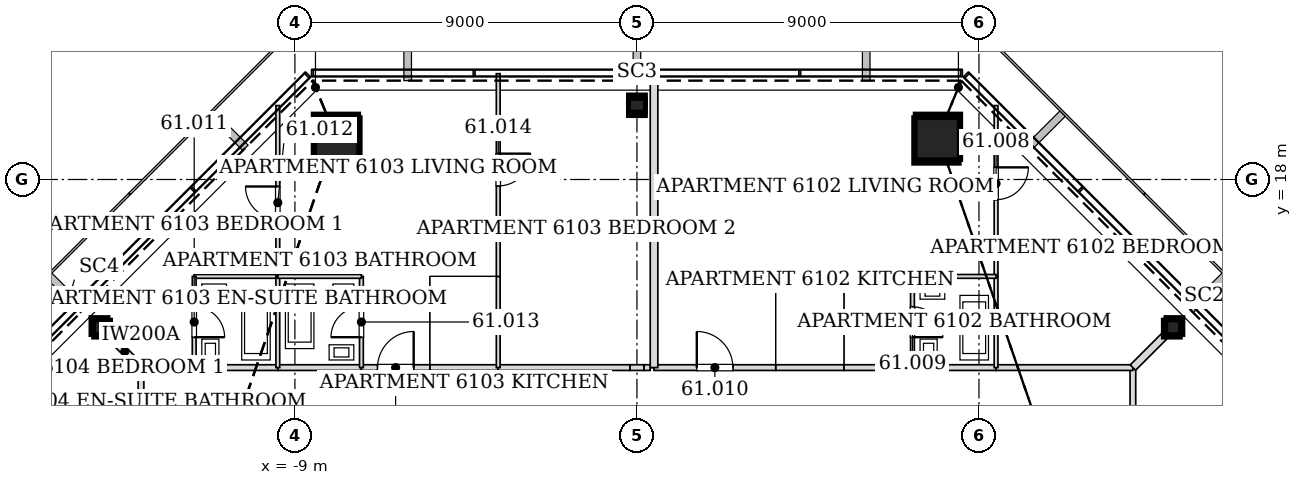
"""IFC4 building model, lengths in metres.
Left out: names, types, materials, properties, quantities, classifications, styles, units other than length and angle.
Written with IfcOpenShell. Run it as: python <this file> out.ifc"""

import sys

from ifc_helpers import new_model, si_unit, direction, frame, frame_2d, origin, origin_2d, place, context, subcontext, project, spatial, rectangle, hollow_rectangle, extrude, element, fill, save


model = new_model("IFC4")
c1 = context("Model", 3, precision=1e-05, world=origin(), true_north=direction((0.0, 1.0)))
c2 = subcontext(c1, "Body", "Model", "MODEL_VIEW")
j1 = project(units=[si_unit("LENGTHUNIT", "METRE"), si_unit("PLANEANGLEUNIT", "RADIAN")], contexts=[c1])
p1 = place(None, origin())
s1 = spatial("IfcSite", under=j1, at=p1, CompositionType="ELEMENT")
p2 = place(p1, origin())
s2 = spatial("IfcBuilding", under=s1, at=p2, CompositionType="ELEMENT")
p3 = place(p2, frame((0.0, 0.0, 255.0)))
s3 = spatial("IfcBuildingStorey", under=s2, at=p3, CompositionType="ELEMENT", Elevation=255.0)
for number, where, z_axis, x_axis in (
    (1, (7.921, 19.123, 0.0), (-0.012, -0.028, 1.0), (0.924, -0.383, 0.0)),
    (2, (-7.921, 19.123, 0.0), (0.012, -0.028, 1.0), (0.924, 0.383, 0.0)),
):
    element("IfcColumn", number, at=place(p3, frame(where, z_axis=z_axis, x_axis=x_axis)), inside=s3, PredefinedType="COLUMN", context=c2, shape_type="SweptSolid", body=[
        extrude(hollow_rectangle(XDim=1.2, YDim=1.2, WallThickness=0.055, at=origin_2d()), origin(), (0.0, 0.0, 1.0), 3.401),
    ])
for number, where, z_axis, x_axis in (
    (3, (14.143, 14.143, 0.0), (-0.02, -0.02, 1.0), (0.707, -0.707, 0.0)),
    (4, (0.0, 20.001, 0.0), (0.0, -0.028, 1.0), (1.0, 0.0, 0.0)),
    (5, (-14.143, 14.143, 0.0), (0.02, -0.02, 1.0), (0.707, 0.707, 0.0)),
):
    element("IfcColumn", number, at=place(p3, frame(where, z_axis=z_axis, x_axis=x_axis)), inside=s3, PredefinedType="COLUMN", context=c2, shape_type="SweptSolid", body=[
        extrude(hollow_rectangle(XDim=0.45, YDim=0.45, WallThickness=0.02, at=origin_2d()), origin(), (0.0, 0.0, 1.0), 3.401),
    ])
p4 = place(p3, frame((13.05, 8.849, 0.0), z_axis=(0.0, 0.0, 1.0), x_axis=(0.0, 1.0, 0.0)))
e6 = element("IfcWall", 6, at=p4, inside=s3, PredefinedType="PARTITIONING", context=c2, shape_type="SweptSolid", body=[
    extrude(rectangle(XDim=4.201, YDim=0.15, at=frame_2d((2.101, 0.0))), origin(), (0.0, 0.0, 1.0), 2.349),
])
p5 = place(p3, frame((13.05, 13.05, 0.0), z_axis=(0.0, 0.0, 1.0), x_axis=(-1.0, 0.0, 0.0)))
e7 = element("IfcWall", 7, at=p5, inside=s3, PredefinedType="PARTITIONING", context=c2, shape_type="SweptSolid", body=[
    extrude(rectangle(XDim=3.601, YDim=0.15, at=frame_2d((1.801, 0.0))), origin(), (0.0, 0.0, 1.0), 2.349),
])
p6 = place(p3, frame((9.451, 13.05, 0.0), z_axis=(0.0, 0.0, 1.0), x_axis=(-1.0, 0.0, 0.0)))
e8 = element("IfcWall", 8, at=p6, inside=s3, PredefinedType="PARTITIONING", context=c2, shape_type="SweptSolid", body=[
    extrude(rectangle(XDim=2.202, YDim=0.15, at=frame_2d((1.101, 0.0))), origin(), (0.0, 0.0, 1.0), 2.662),
])
p7 = place(p3, frame((5.451, 13.05, 0.0), z_axis=(0.0, 0.0, 1.0), x_axis=(-1.0, 0.0, 0.0)))
e9 = element("IfcWall", 9, at=p7, inside=s3, PredefinedType="PARTITIONING", context=c2, shape_type="SweptSolid", body=[
    extrude(rectangle(XDim=1.802, YDim=0.15, at=frame_2d((0.901, 0.0))), origin(), (0.0, 0.0, 1.0), 2.662),
])
p8 = place(p3, frame((3.651, 13.05, 0.0), z_axis=(0.0, 0.0, 1.0), x_axis=(-1.0, 0.0, 0.0)))
e10 = element("IfcWall", 10, at=p8, inside=s3, PredefinedType="PARTITIONING", context=c2, shape_type="SweptSolid", body=[
    extrude(rectangle(XDim=3.202, YDim=0.15, at=frame_2d((1.601, 0.0))), origin(), (0.0, 0.0, 1.0), 2.662),
])
p9 = place(p8, frame((1.126, 0.0, 0.0)))
e11 = element("IfcOpeningElement", 11, at=p9, cuts=e10, PredefinedType="OPENING", context=c2, shape_type="SweptSolid", body=[
    extrude(rectangle(XDim=0.95, YDim=2.1, at=frame_2d((0.475, 1.05))), frame((0.0, 0.085, 0.0), z_axis=(0.0, -1.0, 0.0), x_axis=(1.0, 0.0, 0.0)), (0.0, 0.0, 1.0), 0.17),
])
p10 = place(p3, frame((7.251, 13.05, 0.0), z_axis=(0.0, 0.0, 1.0), x_axis=(-1.0, 0.0, 0.0)))
e12 = element("IfcWall", 12, at=p10, inside=s3, PredefinedType="PARTITIONING", context=c2, shape_type="SweptSolid", body=[
    extrude(rectangle(XDim=1.802, YDim=0.15, at=frame_2d((0.901, 0.0))), origin(), (0.0, 0.0, 1.0), 2.662),
])
p11 = place(p3, frame((-9.449, 13.05, 0.0), z_axis=(0.0, 0.0, 1.0), x_axis=(-1.0, 0.0, 0.0)))
e13 = element("IfcWall", 13, at=p11, inside=s3, PredefinedType="PARTITIONING", context=c2, shape_type="SweptSolid", body=[
    extrude(rectangle(XDim=2.202, YDim=0.15, at=frame_2d((1.101, 0.0))), origin(), (0.0, 0.0, 1.0), 2.349),
])
p12 = place(p3, frame((-11.649, 13.05, 0.0), z_axis=(0.0, 0.0, 1.0), x_axis=(-1.0, 0.0, 0.0)))
e14 = element("IfcWall", 14, at=p12, inside=s3, PredefinedType="PARTITIONING", context=c2, shape_type="SweptSolid", body=[
    extrude(rectangle(XDim=1.401, YDim=0.15, at=frame_2d((0.701, 0.0))), origin(), (0.0, 0.0, 1.0), 2.656),
])
p13 = place(p3, frame((-7.249, 13.05, 0.0), z_axis=(0.0, 0.0, 1.0), x_axis=(-1.0, 0.0, 0.0)))
e15 = element("IfcWall", 15, at=p13, inside=s3, PredefinedType="PARTITIONING", context=c2, shape_type="SweptSolid", body=[
    extrude(rectangle(XDim=2.202, YDim=0.15, at=frame_2d((1.101, 0.0))), origin(), (0.0, 0.0, 1.0), 2.662),
])
p14 = place(p3, frame((-3.649, 13.05, 0.0), z_axis=(0.0, 0.0, 1.0), x_axis=(-1.0, 0.0, 0.0)))
e16 = element("IfcWall", 16, at=p14, inside=s3, PredefinedType="PARTITIONING", context=c2, shape_type="SweptSolid", body=[
    extrude(rectangle(XDim=1.802, YDim=0.15, at=frame_2d((0.901, 0.0))), origin(), (0.0, 0.0, 1.0), 2.662),
])
p15 = place(p3, frame((0.35, 13.05, 0.0), z_axis=(0.0, 0.0, 1.0), x_axis=(-1.0, 0.0, 0.0)))
e17 = element("IfcWall", 17, at=p15, inside=s3, PredefinedType="PARTITIONING", context=c2, shape_type="SweptSolid", body=[
    extrude(rectangle(XDim=0.168, YDim=0.15, at=frame_2d((0.084, 0.0))), origin(), (0.0, 0.0, 1.0), 2.662),
])
p16 = place(p3, frame((-0.182, 13.05, 0.0), z_axis=(0.0, 0.0, 1.0), x_axis=(-1.0, 0.0, 0.0)))
e18 = element("IfcWall", 18, at=p16, inside=s3, PredefinedType="PARTITIONING", context=c2, shape_type="SweptSolid", body=[
    extrude(rectangle(XDim=3.469, YDim=0.15, at=frame_2d((1.734, 0.0))), origin(), (0.0, 0.0, 1.0), 2.662),
])
p17 = place(p3, frame((0.182, 13.05, 0.0), z_axis=(0.0, 0.0, 1.0), x_axis=(-1.0, 0.0, 0.0)))
e19 = element("IfcWall", 19, at=p17, inside=s3, PredefinedType="PARTITIONING", context=c2, shape_type="SweptSolid", body=[
    extrude(rectangle(XDim=0.365, YDim=0.15, at=frame_2d((0.182, 0.0))), origin(), (0.0, 0.0, 1.0), 2.268),
])
p18 = place(p3, frame((-5.449, 13.05, 0.0), z_axis=(0.0, 0.0, 1.0), x_axis=(-1.0, 0.0, 0.0)))
e20 = element("IfcWall", 20, at=p18, inside=s3, PredefinedType="PARTITIONING", context=c2, shape_type="SweptSolid", body=[
    extrude(rectangle(XDim=1.802, YDim=0.15, at=frame_2d((0.901, 0.0))), origin(), (0.0, 0.0, 1.0), 2.662),
])
p19 = place(p18, frame((0.426, 0.0, 0.0)))
e21 = element("IfcOpeningElement", 21, at=p19, cuts=e20, PredefinedType="OPENING", context=c2, shape_type="SweptSolid", body=[
    extrude(rectangle(XDim=0.95, YDim=2.1, at=frame_2d((0.475, 1.05))), frame((0.0, 0.085, 0.0), z_axis=(0.0, -1.0, 0.0), x_axis=(1.0, 0.0, 0.0)), (0.0, 0.0, 1.0), 0.17),
])
p20 = place(p3, frame((-13.05, 13.05, 0.0), z_axis=(0.0, 0.0, 1.0), x_axis=(0.0, -1.0, 0.0)))
e22 = element("IfcWall", 22, at=p20, inside=s3, PredefinedType="PARTITIONING", context=c2, shape_type="SweptSolid", body=[
    extrude(rectangle(XDim=1.401, YDim=0.15, at=frame_2d((0.701, 0.0))), origin(), (0.0, 0.0, 1.0), 2.656),
])
p21 = place(p3, frame((13.902, 13.902, 0.0), z_axis=(0.0, 0.0, 1.0), x_axis=(-0.707106781187, -0.707106781187, 0.0)))
e23 = element("IfcWall", 23, at=p21, inside=s3, PredefinedType="PARTITIONING", context=c2, shape_type="SweptSolid", body=[
    extrude(rectangle(XDim=1.205, YDim=0.2, at=frame_2d((0.603, 0.0))), origin(), (0.0, 0.0, 1.0), 2.656),
])
p22 = place(p3, frame((9.45, 15.451, 0.0), z_axis=(0.0, 0.0, 1.0), x_axis=(0.0, -1.0, 0.0)))
e24 = element("IfcWall", 24, at=p22, inside=s3, PredefinedType="PARTITIONING", context=c2, shape_type="SweptSolid", body=[
    extrude(rectangle(XDim=2.401, YDim=0.1, at=frame_2d((1.2, 0.0))), origin(), (0.0, 0.0, 1.0), 2.349),
])
p23 = place(p3, frame((9.45, 19.945, 0.0), z_axis=(0.0, 0.0, 1.0), x_axis=(0.0, -1.0, 0.0)))
e25 = element("IfcWall", 25, at=p23, inside=s3, PredefinedType="PARTITIONING", context=c2, shape_type="SweptSolid", body=[
    extrude(rectangle(XDim=4.496, YDim=0.1, at=frame_2d((2.248, 0.0))), origin(), (0.0, 0.0, 1.0), 2.74),
])
p24 = place(p23, frame((1.626, 0.0, 0.0)))
e26 = element("IfcOpeningElement", 26, at=p24, cuts=e25, PredefinedType="OPENING", context=c2, shape_type="SweptSolid", body=[
    extrude(rectangle(XDim=0.85, YDim=2.1, at=frame_2d((0.425, 1.05))), frame((0.0, 0.06, 0.0), z_axis=(0.0, -1.0, 0.0), x_axis=(1.0, 0.0, 0.0)), (0.0, 0.0, 1.0), 0.12),
])
p25 = place(p3, frame((9.45, 15.45, 0.0), z_axis=(0.0, 0.0, 1.0), x_axis=(-1.0, 0.0, 0.0)))
e27 = element("IfcWall", 27, at=p25, inside=s3, PredefinedType="PARTITIONING", context=c2, shape_type="SweptSolid", body=[
    extrude(rectangle(XDim=2.2, YDim=0.1, at=frame_2d((1.1, 0.0))), origin(), (0.0, 0.0, 1.0), 2.349),
])
p26 = place(p3, frame((7.25, 15.45, 0.0), z_axis=(0.0, 0.0, 1.0), x_axis=(0.0, -1.0, 0.0)))
e28 = element("IfcWall", 28, at=p26, inside=s3, PredefinedType="PARTITIONING", context=c2, shape_type="SweptSolid", body=[
    extrude(rectangle(XDim=2.4, YDim=0.1, at=frame_2d((1.2, 0.0))), origin(), (0.0, 0.0, 1.0), 2.662),
])
p27 = place(p26, frame((0.8, 0.0, 0.0)))
e29 = element("IfcOpeningElement", 29, at=p27, cuts=e28, PredefinedType="OPENING", context=c2, shape_type="SweptSolid", body=[
    extrude(rectangle(XDim=0.8, YDim=2.1, at=frame_2d((0.4, 1.05))), frame((0.0, 0.06, 0.0), z_axis=(0.0, -1.0, 0.0), x_axis=(1.0, 0.0, 0.0)), (0.0, 0.0, 1.0), 0.12),
])
p28 = place(p3, frame((0.45, 20.783, 0.0), z_axis=(0.0, 0.0, 1.0), x_axis=(0.0, -1.0, 0.0)))
e30 = element("IfcWall", 30, at=p28, inside=s3, PredefinedType="PARTITIONING", context=c2, shape_type="SweptSolid", body=[
    extrude(rectangle(XDim=7.733, YDim=0.2, at=frame_2d((3.867, 0.0))), origin(), (0.0, 0.0, 1.0), 2.662),
])
p29 = place(p3, frame((-9.45, 15.45, 0.0), z_axis=(0.0, 0.0, 1.0), x_axis=(-1.0, 0.0, 0.0)))
e31 = element("IfcWall", 31, at=p29, inside=s3, PredefinedType="PARTITIONING", context=c2, shape_type="SweptSolid", body=[
    extrude(rectangle(XDim=2.2, YDim=0.1, at=frame_2d((1.1, 0.0))), origin(), (0.0, 0.0, 1.0), 2.786),
])
p30 = place(p3, frame((-11.65, 15.45, 0.0), z_axis=(0.0, 0.0, 1.0), x_axis=(0.0, -1.0, 0.0)))
e32 = element("IfcWall", 32, at=p30, inside=s3, PredefinedType="PARTITIONING", context=c2, shape_type="SweptSolid", body=[
    extrude(rectangle(XDim=2.4, YDim=0.1, at=frame_2d((1.2, 0.0))), origin(), (0.0, 0.0, 1.0), 2.786),
])
p31 = place(p30, frame((0.8, 0.0, 0.0)))
e33 = element("IfcOpeningElement", 33, at=p31, cuts=e32, PredefinedType="OPENING", context=c2, shape_type="SweptSolid", body=[
    extrude(rectangle(XDim=0.8, YDim=2.1, at=frame_2d((0.4, 1.05))), frame((0.0, 0.06, 0.0), z_axis=(0.0, -1.0, 0.0), x_axis=(1.0, 0.0, 0.0)), (0.0, 0.0, 1.0), 0.12),
])
p32 = place(p3, frame((-9.45, 13.05, 0.0), z_axis=(0.0, 0.0, 1.0), x_axis=(0.0, 1.0, 0.0)))
e34 = element("IfcWall", 34, at=p32, inside=s3, PredefinedType="PARTITIONING", context=c2, shape_type="SweptSolid", body=[
    extrude(rectangle(XDim=2.4, YDim=0.1, at=frame_2d((1.2, 0.0))), origin(), (0.0, 0.0, 1.0), 2.349),
])
p33 = place(p3, frame((-9.45, 15.45, 0.0), z_axis=(0.0, 0.0, 1.0), x_axis=(0.0, 1.0, 0.0)))
e35 = element("IfcWall", 35, at=p33, inside=s3, PredefinedType="PARTITIONING", context=c2, shape_type="SweptSolid", body=[
    extrude(rectangle(XDim=4.495, YDim=0.1, at=frame_2d((2.248, 0.0))), origin(), (0.0, 0.0, 1.0), 2.74),
])
p34 = place(p33, frame((1.515, 0.0, 0.0)))
e36 = element("IfcOpeningElement", 36, at=p34, cuts=e35, PredefinedType="OPENING", context=c2, shape_type="SweptSolid", body=[
    extrude(rectangle(XDim=0.85, YDim=2.1, at=frame_2d((0.425, 1.05))), frame((0.0, 0.06, 0.0), z_axis=(0.0, -1.0, 0.0), x_axis=(1.0, 0.0, 0.0)), (0.0, 0.0, 1.0), 0.12),
])
p35 = place(p3, frame((-13.902, 13.902, 0.0), z_axis=(0.0, 0.0, 1.0), x_axis=(0.707106781187, -0.707106781187, 0.0)))
e37 = element("IfcWall", 37, at=p35, inside=s3, PredefinedType="PARTITIONING", context=c2, shape_type="SweptSolid", body=[
    extrude(rectangle(XDim=1.205, YDim=0.2, at=frame_2d((0.603, 0.0))), origin(), (0.0, 0.0, 1.0), 2.656),
])
p36 = place(p3, frame((-7.25, 13.05, 0.0), z_axis=(0.0, 0.0, 1.0), x_axis=(0.0, 1.0, 0.0)))
e38 = element("IfcWall", 38, at=p36, inside=s3, PredefinedType="PARTITIONING", context=c2, shape_type="SweptSolid", body=[
    extrude(rectangle(XDim=2.4, YDim=0.1, at=frame_2d((1.2, 0.0))), origin(), (0.0, 0.0, 1.0), 2.662),
])
p37 = place(p36, frame((0.8, 0.0, 0.0)))
e39 = element("IfcOpeningElement", 39, at=p37, cuts=e38, PredefinedType="OPENING", context=c2, shape_type="SweptSolid", body=[
    extrude(rectangle(XDim=0.8, YDim=2.1, at=frame_2d((0.4, 1.05))), frame((0.0, 0.06, 0.0), z_axis=(0.0, -1.0, 0.0), x_axis=(1.0, 0.0, 0.0)), (0.0, 0.0, 1.0), 0.12),
])
p38 = place(p3, frame((-7.25, 15.45, 0.0), z_axis=(0.0, 0.0, 1.0), x_axis=(-1.0, 0.0, 0.0)))
e40 = element("IfcWall", 40, at=p38, inside=s3, PredefinedType="PARTITIONING", context=c2, shape_type="SweptSolid", body=[
    extrude(rectangle(XDim=2.2, YDim=0.1, at=frame_2d((1.1, 0.0))), origin(), (0.0, 0.0, 1.0), 2.349),
])
p39 = place(p3, frame((-3.65, 13.05, 0.0), z_axis=(0.0, 0.0, 1.0), x_axis=(0.0, 1.0, 0.0)))
e41 = element("IfcWall", 41, at=p39, inside=s3, PredefinedType="PARTITIONING", context=c2, shape_type="SweptSolid", body=[
    extrude(rectangle(XDim=2.4, YDim=0.1, at=frame_2d((1.2, 0.0))), origin(), (0.0, 0.0, 1.0), 2.662),
])
p40 = place(p3, frame((-3.65, 20.785, 0.0), z_axis=(0.0, 0.0, 1.0), x_axis=(0.0, -1.0, 0.0)))
e42 = element("IfcWall", 42, at=p40, inside=s3, PredefinedType="PARTITIONING", context=c2, shape_type="SweptSolid", body=[
    extrude(rectangle(XDim=5.336, YDim=0.1, at=frame_2d((2.668, 0.0))), origin(), (0.0, 0.0, 1.0), 2.662),
])
p41 = place(p40, frame((2.105, 0.0, 0.0)))
e43 = element("IfcOpeningElement", 43, at=p41, cuts=e42, PredefinedType="OPENING", context=c2, shape_type="SweptSolid", body=[
    extrude(rectangle(XDim=0.85, YDim=2.1, at=frame_2d((0.425, 1.05))), frame((0.0, 0.06, 0.0), z_axis=(0.0, -1.0, 0.0), x_axis=(1.0, 0.0, 0.0)), (0.0, 0.0, 1.0), 0.12),
])
p42 = place(p24, origin())
e44 = element("IfcDoor", 44, at=p42, inside=s3, OperationType="SINGLE_SWING_LEFT", PredefinedType="DOOR", context=c2, shape_type="SweptSolid", body=[
    extrude(rectangle(XDim=0.85, YDim=2.1, at=frame_2d((0.425, 1.05))), frame((0.0, 0.025, 0.0), z_axis=(0.0, -1.0, 0.0), x_axis=(1.0, 0.0, 0.0)), (0.0, 0.0, 1.0), 0.05),
])
fill(e26, e44)
p43 = place(p27, origin())
e45 = element("IfcDoor", 45, at=p43, inside=s3, OperationType="SINGLE_SWING_RIGHT", PredefinedType="DOOR", context=c2, shape_type="SweptSolid", body=[
    extrude(rectangle(XDim=0.8, YDim=2.1, at=frame_2d((0.4, 1.05))), frame((0.0, 0.025, 0.0), z_axis=(0.0, -1.0, 0.0), x_axis=(1.0, 0.0, 0.0)), (0.0, 0.0, 1.0), 0.05),
])
fill(e29, e45)
p44 = place(p9, frame((0.95, 0.0, 0.0), z_axis=(0.0, 0.0, 1.0), x_axis=(-1.0, 0.0, 0.0)))
e46 = element("IfcDoor", 46, at=p44, inside=s3, OperationType="SINGLE_SWING_LEFT", PredefinedType="DOOR", context=c2, shape_type="SweptSolid", body=[
    extrude(rectangle(XDim=0.95, YDim=2.1, at=frame_2d((0.475, 1.05))), frame((0.0, 0.025, 0.0), z_axis=(0.0, -1.0, 0.0), x_axis=(1.0, 0.0, 0.0)), (0.0, 0.0, 1.0), 0.05),
])
fill(e11, e46)
p45 = place(p31, origin())
e47 = element("IfcDoor", 47, at=p45, inside=s3, OperationType="SINGLE_SWING_RIGHT", PredefinedType="DOOR", context=c2, shape_type="SweptSolid", body=[
    extrude(rectangle(XDim=0.8, YDim=2.1, at=frame_2d((0.4, 1.05))), frame((0.0, 0.025, 0.0), z_axis=(0.0, -1.0, 0.0), x_axis=(1.0, 0.0, 0.0)), (0.0, 0.0, 1.0), 0.05),
])
fill(e33, e47)
p46 = place(p34, origin())
e48 = element("IfcDoor", 48, at=p46, inside=s3, OperationType="SINGLE_SWING_RIGHT", PredefinedType="DOOR", context=c2, shape_type="SweptSolid", body=[
    extrude(rectangle(XDim=0.85, YDim=2.1, at=frame_2d((0.425, 1.05))), frame((0.0, 0.025, 0.0), z_axis=(0.0, -1.0, 0.0), x_axis=(1.0, 0.0, 0.0)), (0.0, 0.0, 1.0), 0.05),
])
fill(e36, e48)
p47 = place(p37, origin())
e49 = element("IfcDoor", 49, at=p47, inside=s3, OperationType="SINGLE_SWING_LEFT", PredefinedType="DOOR", context=c2, shape_type="SweptSolid", body=[
    extrude(rectangle(XDim=0.8, YDim=2.1, at=frame_2d((0.4, 1.05))), frame((0.0, 0.025, 0.0), z_axis=(0.0, -1.0, 0.0), x_axis=(1.0, 0.0, 0.0)), (0.0, 0.0, 1.0), 0.05),
])
fill(e39, e49)
p48 = place(p41, origin())
e50 = element("IfcDoor", 50, at=p48, inside=s3, OperationType="SINGLE_SWING_LEFT", PredefinedType="DOOR", context=c2, shape_type="SweptSolid", body=[
    extrude(rectangle(XDim=0.85, YDim=2.1, at=frame_2d((0.425, 1.05))), frame((0.0, 0.025, 0.0), z_axis=(0.0, -1.0, 0.0), x_axis=(1.0, 0.0, 0.0)), (0.0, 0.0, 1.0), 0.05),
])
fill(e43, e50)
p49 = place(p19, frame((0.95, 0.0, 0.0), z_axis=(0.0, 0.0, 1.0), x_axis=(-1.0, 0.0, 0.0)))
e51 = element("IfcDoor", 51, at=p49, inside=s3, OperationType="SINGLE_SWING_RIGHT", PredefinedType="DOOR", context=c2, shape_type="SweptSolid", body=[
    extrude(rectangle(XDim=0.95, YDim=2.1, at=frame_2d((0.475, 1.05))), frame((0.0, 0.025, 0.0), z_axis=(0.0, -1.0, 0.0), x_axis=(1.0, 0.0, 0.0)), (0.0, 0.0, 1.0), 0.05),
])
fill(e21, e51)
save(model, sys.argv[1])
